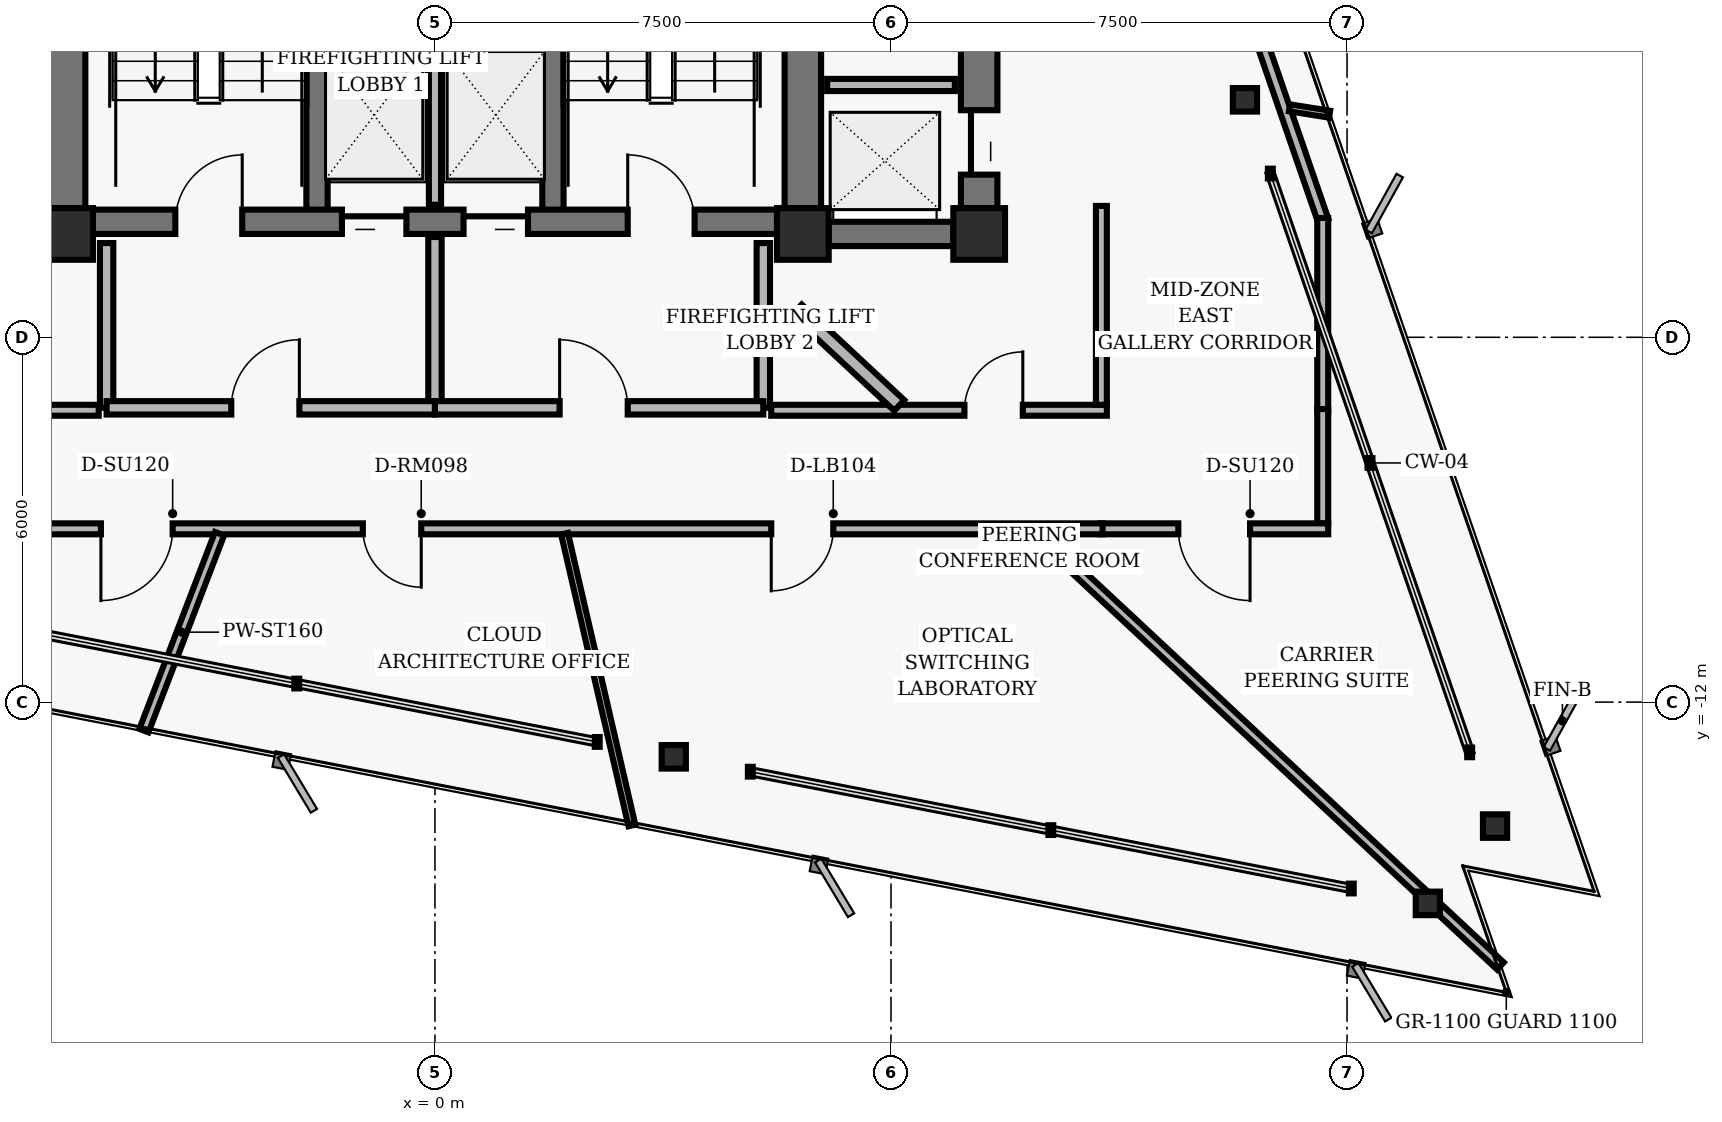
"""IFC4 building model, lengths in metres.
Left out: names, types, materials, properties, quantities, classifications, styles, units other than length and angle.
Written with IfcOpenShell. Run it as: python <this file> out.ifc"""

import sys

from ifc_helpers import new_model, si_unit, direction, frame, frame_2d, origin, origin_2d, place, context, subcontext, project, spatial, rectangle, hollow_rectangle, i_section, extrude, element, fill, save


model = new_model("IFC4")
c1 = context("Model", 3, precision=1e-05, world=origin(), true_north=direction((0.0, 1.0)))
c2 = subcontext(c1, "Body", "Model", "MODEL_VIEW")
j1 = project(units=[si_unit("LENGTHUNIT", "METRE"), si_unit("PLANEANGLEUNIT", "RADIAN")], contexts=[c1])
p1 = place(None, origin())
s1 = spatial("IfcSite", under=j1, at=p1, CompositionType="ELEMENT")
p2 = place(p1, origin())
s2 = spatial("IfcBuilding", under=s1, at=p2, CompositionType="ELEMENT")
p3 = place(p2, frame((0.0, 0.0, 168.48)))
s3 = spatial("IfcBuildingStorey", under=s2, at=p3, CompositionType="ELEMENT", Elevation=168.48)
for number, where, z_axis, x_axis in (
    (1, (-6.05, -4.3, 0.0), (0.0, 0.0, 1.0), (1.0, 0.0, 0.0)),
    (2, (6.05, -4.3, 0.0), (0.0, 0.0, 1.0), (1.0, 0.0, 0.0)),
    (3, (8.95, -4.3, 0.0), (0.0, 0.0, 1.0), (1.0, 0.0, 0.0)),
):
    element("IfcColumn", number, at=place(p3, frame(where, z_axis=z_axis, x_axis=x_axis)), inside=s3, PredefinedType="COLUMN", context=c2, shape_type="SweptSolid", body=[
        extrude(hollow_rectangle(XDim=0.85, YDim=0.85, WallThickness=0.055, InnerFilletRadius=0.02, OuterFilletRadius=0.04, at=origin_2d()), origin(), (0.0, 0.0, 1.0), 3.04),
    ])
for number, where, z_axis, x_axis in (
    (4, (-6.05, -3.875, 0.0), (0.0, 0.0, 1.0), (0.0, 1.0, 0.0)),
    (5, (6.05, -3.875, 0.0), (0.0, 0.0, 1.0), (0.0, 1.0, 0.0)),
):
    element("IfcWall", number, at=place(p3, frame(where, z_axis=z_axis, x_axis=x_axis)), inside=s3, PredefinedType="SHEAR", context=c2, shape_type="SweptSolid", body=[
        extrude(rectangle(XDim=3.45, YDim=0.6, at=frame_2d((1.725, 0.0))), origin(), (0.0, 0.0, 1.0), 2.718),
    ])
for number, where, z_axis, x_axis in (
    (6, (-1.94, -4.1, 0.0), (0.0, 0.0, 1.0), (0.0, 1.0, 0.0)),
    (7, (1.94, -4.1, 0.0), (0.0, 0.0, 1.0), (0.0, 1.0, 0.0)),
):
    element("IfcWall", number, at=place(p3, frame(where, z_axis=z_axis, x_axis=x_axis)), inside=s3, PredefinedType="SHEAR", context=c2, shape_type="SweptSolid", body=[
        extrude(rectangle(XDim=8.2, YDim=0.35, at=frame_2d((4.1, 0.0))), origin(), (0.0, 0.0, 1.0), 2.718),
    ])
p4 = place(p3, frame((-5.625, -4.1, 0.0), z_axis=(0.0, 0.0, 1.0), x_axis=(1.0, 0.0, 0.0)))
e8 = element("IfcWall", 8, at=p4, inside=s3, PredefinedType="SHEAR", context=c2, shape_type="SweptSolid", body=[
    extrude(rectangle(XDim=11.25, YDim=0.4, at=frame_2d((5.625, 0.0))), origin(), (0.0, 0.0, 1.0), 2.718),
])
p5 = place(p4, frame((1.355, 0.0, 0.0)))
e9 = element("IfcOpeningElement", 9, at=p5, cuts=e8, PredefinedType="OPENING", context=c2, shape_type="SweptSolid", body=[
    extrude(rectangle(XDim=1.1, YDim=2.04, at=frame_2d((0.55, 1.02))), frame((0.0, 0.21, 0.0), z_axis=(0.0, -1.0, 0.0), x_axis=(1.0, 0.0, 0.0)), (0.0, 0.0, 1.0), 0.42),
])
p6 = place(p4, frame((8.795, 0.0, 0.0)))
e10 = element("IfcOpeningElement", 10, at=p6, cuts=e8, PredefinedType="OPENING", context=c2, shape_type="SweptSolid", body=[
    extrude(rectangle(XDim=1.1, YDim=2.04, at=frame_2d((0.55, 1.02))), frame((0.0, 0.21, 0.0), z_axis=(0.0, -1.0, 0.0), x_axis=(1.0, 0.0, 0.0)), (0.0, 0.0, 1.0), 0.42),
])
p7 = place(p4, frame((4.095, 0.0, 0.0)))
e11 = element("IfcOpeningElement", 11, at=p7, cuts=e8, PredefinedType="OPENING", context=c2, shape_type="SweptSolid", body=[
    extrude(rectangle(XDim=1.06, YDim=2.04, at=frame_2d((0.53, 1.02))), frame((0.0, 0.21, 0.0), z_axis=(0.0, -1.0, 0.0), x_axis=(1.0, 0.0, 0.0)), (0.0, 0.0, 1.0), 0.42),
])
p8 = place(p4, frame((6.095, 0.0, 0.0)))
e12 = element("IfcOpeningElement", 12, at=p8, cuts=e8, PredefinedType="OPENING", context=c2, shape_type="SweptSolid", body=[
    extrude(rectangle(XDim=1.06, YDim=2.04, at=frame_2d((0.53, 1.02))), frame((0.0, 0.21, 0.0), z_axis=(0.0, -1.0, 0.0), x_axis=(1.0, 0.0, 0.0)), (0.0, 0.0, 1.0), 0.42),
])
p9 = place(p3, frame((8.95, -3.875, 0.0), z_axis=(0.0, 0.0, 1.0), x_axis=(0.0, 1.0, 0.0)))
e13 = element("IfcWall", 13, at=p9, inside=s3, PredefinedType="SHEAR", context=c2, shape_type="SweptSolid", body=[
    extrude(rectangle(XDim=7.95, YDim=0.6, at=frame_2d((3.975, 0.0))), origin(), (0.0, 0.0, 1.0), 2.718),
])
p10 = place(p9, frame((0.55, 0.0, 0.0)))
e14 = element("IfcOpeningElement", 14, at=p10, cuts=e13, PredefinedType="OPENING", context=c2, shape_type="SweptSolid", body=[
    extrude(rectangle(XDim=1.06, YDim=2.04, at=frame_2d((0.53, 1.02))), frame((0.0, 0.31, 0.0), z_axis=(0.0, -1.0, 0.0), x_axis=(1.0, 0.0, 0.0)), (0.0, 0.0, 1.0), 0.62),
])
p11 = place(p9, frame((3.445, 0.0, 0.0)))
e15 = element("IfcOpeningElement", 15, at=p11, cuts=e13, PredefinedType="OPENING", context=c2, shape_type="SweptSolid", body=[
    extrude(rectangle(XDim=1.06, YDim=2.04, at=frame_2d((0.53, 1.02))), frame((0.0, 0.31, 0.0), z_axis=(0.0, -1.0, 0.0), x_axis=(1.0, 0.0, 0.0)), (0.0, 0.0, 1.0), 0.62),
])
p12 = place(p9, frame((6.33, 0.0, 0.0)))
e16 = element("IfcOpeningElement", 16, at=p12, cuts=e13, PredefinedType="OPENING", context=c2, shape_type="SweptSolid", body=[
    extrude(rectangle(XDim=1.06, YDim=2.04, at=frame_2d((0.53, 1.02))), frame((0.0, 0.31, 0.0), z_axis=(0.0, -1.0, 0.0), x_axis=(1.0, 0.0, 0.0)), (0.0, 0.0, 1.0), 0.62),
])
p13 = place(p3, frame((6.475, -4.3, 0.0), z_axis=(0.0, 0.0, 1.0), x_axis=(1.0, 0.0, 0.0)))
e17 = element("IfcWall", 17, at=p13, inside=s3, PredefinedType="SHEAR", context=c2, shape_type="SweptSolid", body=[
    extrude(rectangle(XDim=2.05, YDim=0.4, at=frame_2d((1.025, 0.0))), origin(), (0.0, 0.0, 1.0), 2.718),
])
for number, where, z_axis, x_axis in (
    (18, (17.434, -14.039, 0.0), (0.0, 0.0, 1.0), (1.0, 0.0, 0.0)),
    (19, (13.321, -2.094, 0.0), (0.0, 0.0, 1.0), (1.0, 0.0, 0.0)),
    (20, (3.927, -12.9, 0.0), (0.0, 0.0, 1.0), (1.0, 0.0, 0.0)),
    (21, (16.329, -15.311, 0.0), (0.0, 0.0, 1.0), (1.0, 0.0, 0.0)),
):
    element("IfcColumn", number, at=place(p3, frame(where, z_axis=z_axis, x_axis=x_axis)), inside=s3, PredefinedType="COLUMN", context=c2, shape_type="SweptSolid", body=[
        extrude(i_section(OverallWidth=0.398, OverallDepth=0.387, WebThickness=0.021, FlangeThickness=0.033, FilletRadius=0.018, at=origin_2d()), origin(), (0.0, 0.0, 1.0), 3.04),
    ])
p14 = place(p3, frame((0.0, -3.82, 0.0), z_axis=(0.0, 0.0, 1.0), x_axis=(0.0, 1.0, 0.0)))
e22 = element("IfcWall", 22, at=p14, inside=s3, PredefinedType="PARTITIONING", context=c2, shape_type="SweptSolid", body=[
    extrude(rectangle(XDim=2.67, YDim=0.2, at=frame_2d((1.335, 0.0))), origin(), (0.0, 0.0, 1.0), 2.693),
])
for number, where, z_axis, x_axis in (
    (23, (-5.4, -7.16, 0.0), (0.0, 0.0, 1.0), (0.0, 1.0, 0.0)),
    (24, (5.4, -7.16, 0.0), (0.0, 0.0, 1.0), (0.0, 1.0, 0.0)),
):
    element("IfcWall", number, at=place(p3, frame(where, z_axis=z_axis, x_axis=x_axis)), inside=s3, PredefinedType="PARTITIONING", context=c2, shape_type="SweptSolid", body=[
        extrude(rectangle(XDim=2.71, YDim=0.22, at=frame_2d((1.355, 0.0))), origin(), (0.0, 0.0, 1.0), 2.693),
    ])
p15 = place(p3, frame((0.0, -7.16, 0.0), z_axis=(0.0, 0.0, 1.0), x_axis=(0.0, 1.0, 0.0)))
e25 = element("IfcWall", 25, at=p15, inside=s3, PredefinedType="PARTITIONING", context=c2, shape_type="SweptSolid", body=[
    extrude(rectangle(XDim=2.81, YDim=0.22, at=frame_2d((1.405, 0.0))), origin(), (0.0, 0.0, 1.0), 2.693),
])
p16 = place(p3, frame((-5.4, -7.16, 0.0), z_axis=(0.0, 0.0, 1.0), x_axis=(1.0, 0.0, 0.0)))
e26 = element("IfcWall", 26, at=p16, inside=s3, PredefinedType="PARTITIONING", context=c2, shape_type="SweptSolid", body=[
    extrude(rectangle(XDim=5.4, YDim=0.22, at=frame_2d((2.7, 0.0))), origin(), (0.0, 0.0, 1.0), 2.26),
])
p17 = place(p16, frame((2.05, 0.0, 0.0)))
e27 = element("IfcOpeningElement", 27, at=p17, cuts=e26, PredefinedType="OPENING", context=c2, shape_type="SweptSolid", body=[
    extrude(rectangle(XDim=1.12, YDim=2.02, at=frame_2d((0.56, 1.01))), frame((0.0, 0.12, 0.0), z_axis=(0.0, -1.0, 0.0), x_axis=(1.0, 0.0, 0.0)), (0.0, 0.0, 1.0), 0.24),
])
p18 = place(p3, frame((0.0, -7.16, 0.0), z_axis=(0.0, 0.0, 1.0), x_axis=(1.0, 0.0, 0.0)))
e28 = element("IfcWall", 28, at=p18, inside=s3, PredefinedType="PARTITIONING", context=c2, shape_type="SweptSolid", body=[
    extrude(rectangle(XDim=5.4, YDim=0.22, at=frame_2d((2.7, 0.0))), origin(), (0.0, 0.0, 1.0), 2.26),
])
p19 = place(p18, frame((2.05, 0.0, 0.0)))
e29 = element("IfcOpeningElement", 29, at=p19, cuts=e28, PredefinedType="OPENING", context=c2, shape_type="SweptSolid", body=[
    extrude(rectangle(XDim=1.12, YDim=2.02, at=frame_2d((0.56, 1.01))), frame((0.0, 0.12, 0.0), z_axis=(0.0, -1.0, 0.0), x_axis=(1.0, 0.0, 0.0)), (0.0, 0.0, 1.0), 0.24),
])
p20 = place(p3, frame((6.45, -1.85, 0.0), z_axis=(0.0, 0.0, 1.0), x_axis=(1.0, 0.0, 0.0)))
e30 = element("IfcWall", 30, at=p20, inside=s3, PredefinedType="PARTITIONING", context=c2, shape_type="SweptSolid", body=[
    extrude(rectangle(XDim=2.1, YDim=0.2, at=frame_2d((1.05, 0.0))), origin(), (0.0, 0.0, 1.0), 2.693),
])
p21 = place(p3, frame((-6.59, -7.2, 0.0), z_axis=(0.0, 0.0, 1.0), x_axis=(1.0, 0.0, 0.0)))
e31 = element("IfcWall", 31, at=p21, inside=s3, PredefinedType="PARTITIONING", context=c2, shape_type="SweptSolid", body=[
    extrude(rectangle(XDim=1.06, YDim=0.18, at=frame_2d((0.53, 0.0))), origin(), (0.0, 0.0, 1.0), 2.693),
])
p22 = place(p3, frame((5.53, -7.2, 0.0), z_axis=(0.0, 0.0, 1.0), x_axis=(1.0, 0.0, 0.0)))
e32 = element("IfcWall", 32, at=p22, inside=s3, PredefinedType="PARTITIONING", context=c2, shape_type="SweptSolid", body=[
    extrude(rectangle(XDim=5.52, YDim=0.18, at=frame_2d((2.76, 0.0))), origin(), (0.0, 0.0, 1.0), 2.26),
])
p23 = place(p22, frame((3.177, 0.0, 0.0)))
e33 = element("IfcOpeningElement", 33, at=p23, cuts=e32, PredefinedType="OPENING", context=c2, shape_type="SweptSolid", body=[
    extrude(rectangle(XDim=0.96, YDim=2.02, at=frame_2d((0.48, 1.01))), frame((0.0, 0.1, 0.0), z_axis=(0.0, -1.0, 0.0), x_axis=(1.0, 0.0, 0.0)), (0.0, 0.0, 1.0), 0.2),
])
p24 = place(p3, frame((10.96, -7.11, 0.0), z_axis=(0.0, 0.0, 1.0), x_axis=(0.0, 1.0, 0.0)))
e34 = element("IfcWall", 34, at=p24, inside=s3, PredefinedType="PARTITIONING", context=c2, shape_type="SweptSolid", body=[
    extrude(rectangle(XDim=3.271, YDim=0.18, at=frame_2d((1.635, 0.0))), origin(), (0.0, 0.0, 1.0), 2.693),
])
p25 = place(p3, frame((10.954, 6.533, 0.0), z_axis=(0.0, 0.0, 1.0), x_axis=(0.325553439946, -0.945523642084, 0.0)))
e35 = element("IfcWall", 35, at=p25, inside=s3, PredefinedType="PARTITIONING", context=c2, shape_type="SweptSolid", body=[
    extrude(rectangle(XDim=11.22, YDim=0.18, at=frame_2d((5.61, 0.0))), origin(), (0.0, 0.0, 1.0), 2.693),
])
p26 = place(p3, frame((14.6, -4.038, 0.0), z_axis=(0.0, 0.0, 1.0), x_axis=(0.0, -1.0, 0.0)))
e36 = element("IfcWall", 36, at=p26, inside=s3, PredefinedType="PARTITIONING", context=c2, shape_type="SweptSolid", body=[
    extrude(rectangle(XDim=3.182, YDim=0.18, at=frame_2d((1.591, 0.0))), origin(), (0.0, 0.0, 1.0), 2.693),
])
p27 = place(p3, frame((14.6, -7.18, 0.0), z_axis=(0.0, 0.0, 1.0), x_axis=(0.0, -1.0, 0.0)))
e37 = element("IfcWall", 37, at=p27, inside=s3, PredefinedType="PARTITIONING", context=c2, shape_type="SweptSolid", body=[
    extrude(rectangle(XDim=1.88, YDim=0.18, at=frame_2d((0.94, 0.0))), origin(), (0.0, 0.0, 1.0), 2.693),
])
p28 = place(p3, frame((14.69, -9.15, 0.0), z_axis=(0.0, 0.0, 1.0), x_axis=(-1.0, 0.0, 0.0)))
e38 = element("IfcWall", 38, at=p28, inside=s3, PredefinedType="PARTITIONING", context=c2, shape_type="SweptSolid", body=[
    extrude(rectangle(XDim=3.75, YDim=0.18, at=frame_2d((1.875, 0.0))), origin(), (0.0, 0.0, 1.0), 2.693),
])
p29 = place(p28, frame((1.285, 0.0, 0.0)))
e39 = element("IfcOpeningElement", 39, at=p29, cuts=e38, PredefinedType="OPENING", context=c2, shape_type="SweptSolid", body=[
    extrude(rectangle(XDim=1.18, YDim=2.02, at=frame_2d((0.59, 1.01))), frame((0.0, 0.1, 0.0), z_axis=(0.0, -1.0, 0.0), x_axis=(1.0, 0.0, 0.0)), (0.0, 0.0, 1.0), 0.2),
])
p30 = place(p3, frame((10.98, -9.15, 0.0), z_axis=(0.0, 0.0, 1.0), x_axis=(-1.0, 0.0, 0.0)))
e40 = element("IfcWall", 40, at=p30, inside=s3, PredefinedType="PARTITIONING", context=c2, shape_type="SweptSolid", body=[
    extrude(rectangle(XDim=17.5, YDim=0.18, at=frame_2d((8.75, 0.0))), origin(), (0.0, 0.0, 1.0), 2.26),
])
p31 = place(p30, frame((15.294, 0.0, 0.0)))
e41 = element("IfcOpeningElement", 41, at=p31, cuts=e40, PredefinedType="OPENING", context=c2, shape_type="SweptSolid", body=[
    extrude(rectangle(XDim=1.18, YDim=2.02, at=frame_2d((0.59, 1.01))), frame((0.0, 0.1, 0.0), z_axis=(0.0, -1.0, 0.0), x_axis=(1.0, 0.0, 0.0)), (0.0, 0.0, 1.0), 0.2),
])
p32 = place(p30, frame((11.206, 0.0, 0.0)))
e42 = element("IfcOpeningElement", 42, at=p32, cuts=e40, PredefinedType="OPENING", context=c2, shape_type="SweptSolid", body=[
    extrude(rectangle(XDim=0.96, YDim=2.02, at=frame_2d((0.48, 1.01))), frame((0.0, 0.1, 0.0), z_axis=(0.0, -1.0, 0.0), x_axis=(1.0, 0.0, 0.0)), (0.0, 0.0, 1.0), 0.2),
])
p33 = place(p30, frame((4.43, 0.0, 0.0)))
e43 = element("IfcOpeningElement", 43, at=p33, cuts=e40, PredefinedType="OPENING", context=c2, shape_type="SweptSolid", body=[
    extrude(rectangle(XDim=1.02, YDim=2.02, at=frame_2d((0.51, 1.01))), frame((0.0, 0.1, 0.0), z_axis=(0.0, -1.0, 0.0), x_axis=(1.0, 0.0, 0.0)), (0.0, 0.0, 1.0), 0.2),
])
p34 = place(p3, frame((-3.543, -9.23, 0.0), z_axis=(0.0, 0.0, 1.0), x_axis=(-0.358337785815, -0.933592004709, 0.0)))
e44 = element("IfcWall", 44, at=p34, inside=s3, PredefinedType="PARTITIONING", context=c2, shape_type="SweptSolid", body=[
    extrude(rectangle(XDim=3.47, YDim=0.16, at=frame_2d((1.735, 0.0))), origin(), (0.0, 0.0, 1.0), 2.693),
])
p35 = place(p3, frame((2.131, -9.23, 0.0), z_axis=(0.0, 0.0, 1.0), x_axis=(0.224978964049, -0.974363620901, 0.0)))
e45 = element("IfcWall", 45, at=p35, inside=s3, PredefinedType="MOVABLE", context=c2, shape_type="SweptSolid", body=[
    extrude(rectangle(XDim=4.926, YDim=0.115, at=frame_2d((2.463, 0.0))), origin(), (0.0, 0.0, 1.0), 2.693),
])
p36 = place(p3, frame((5.95, -5.549, 0.0), z_axis=(0.0, 0.0, 1.0), x_axis=(0.731361714987, -0.681989766677, 0.0)))
e46 = element("IfcWall", 46, at=p36, inside=s3, PredefinedType="PARTITIONING", context=c2, shape_type="SweptSolid", body=[
    extrude(rectangle(XDim=2.304, YDim=0.24, at=frame_2d((1.152, 0.0))), origin(), (0.0, 0.0, 1.0), 2.693),
])
p37 = place(p3, frame((9.898, -9.23, 0.0), z_axis=(0.0, 0.0, 1.0), x_axis=(0.731357336059, -0.681994462582, 0.0)))
e47 = element("IfcWall", 47, at=p37, inside=s3, PredefinedType="PARTITIONING", context=c2, shape_type="SweptSolid", body=[
    extrude(rectangle(XDim=10.426, YDim=0.16, at=frame_2d((5.213, 0.0))), origin(), (0.0, 0.0, 1.0), 2.062),
])
p38 = place(p3, frame((14.054, -2.226, 0.0), z_axis=(0.0, 0.0, 1.0), x_axis=(0.987638222243, -0.156750572454, 0.0)))
e48 = element("IfcWall", 48, at=p38, inside=s3, PredefinedType="MOVABLE", context=c2, shape_type="SweptSolid", body=[
    extrude(rectangle(XDim=0.668, YDim=0.115, at=frame_2d((0.334, 0.0))), origin(), (0.0, 0.0, 1.0), 2.693),
])
p39 = place(p5, origin())
e49 = element("IfcDoor", 49, at=p39, inside=s3, OperationType="SINGLE_SWING_RIGHT", PredefinedType="DOOR", context=c2, shape_type="SweptSolid", body=[
    extrude(rectangle(XDim=1.1, YDim=2.04, at=frame_2d((0.55, 1.02))), frame((0.0, 0.025, 0.0), z_axis=(0.0, -1.0, 0.0), x_axis=(1.0, 0.0, 0.0)), (0.0, 0.0, 1.0), 0.05),
])
fill(e9, e49)
p40 = place(p6, origin())
e50 = element("IfcDoor", 50, at=p40, inside=s3, OperationType="SINGLE_SWING_LEFT", PredefinedType="DOOR", context=c2, shape_type="SweptSolid", body=[
    extrude(rectangle(XDim=1.1, YDim=2.04, at=frame_2d((0.55, 1.02))), frame((0.0, 0.025, 0.0), z_axis=(0.0, -1.0, 0.0), x_axis=(1.0, 0.0, 0.0)), (0.0, 0.0, 1.0), 0.05),
])
fill(e10, e50)
p41 = place(p7, origin())
e51 = element("IfcDoor", 51, at=p41, inside=s3, OperationType="SLIDING_TO_LEFT", PredefinedType="DOOR", context=c2, shape_type="SweptSolid", body=[
    extrude(rectangle(XDim=1.06, YDim=2.04, at=frame_2d((0.53, 1.02))), frame((0.0, 0.025, 0.0), z_axis=(0.0, -1.0, 0.0), x_axis=(1.0, 0.0, 0.0)), (0.0, 0.0, 1.0), 0.05),
])
fill(e11, e51)
p42 = place(p8, origin())
e52 = element("IfcDoor", 52, at=p42, inside=s3, OperationType="SLIDING_TO_RIGHT", PredefinedType="DOOR", context=c2, shape_type="SweptSolid", body=[
    extrude(rectangle(XDim=1.06, YDim=2.04, at=frame_2d((0.53, 1.02))), frame((0.0, 0.025, 0.0), z_axis=(0.0, -1.0, 0.0), x_axis=(1.0, 0.0, 0.0)), (0.0, 0.0, 1.0), 0.05),
])
fill(e12, e52)
p43 = place(p17, origin())
e53 = element("IfcDoor", 53, at=p43, inside=s3, OperationType="SINGLE_SWING_RIGHT", PredefinedType="DOOR", context=c2, shape_type="SweptSolid", body=[
    extrude(rectangle(XDim=1.12, YDim=2.02, at=frame_2d((0.56, 1.01))), frame((0.0, 0.025, 0.0), z_axis=(0.0, -1.0, 0.0), x_axis=(1.0, 0.0, 0.0)), (0.0, 0.0, 1.0), 0.05),
])
fill(e27, e53)
p44 = place(p19, origin())
e54 = element("IfcDoor", 54, at=p44, inside=s3, OperationType="SINGLE_SWING_LEFT", PredefinedType="DOOR", context=c2, shape_type="SweptSolid", body=[
    extrude(rectangle(XDim=1.12, YDim=2.02, at=frame_2d((0.56, 1.01))), frame((0.0, 0.025, 0.0), z_axis=(0.0, -1.0, 0.0), x_axis=(1.0, 0.0, 0.0)), (0.0, 0.0, 1.0), 0.05),
])
fill(e29, e54)
p45 = place(p10, origin())
e55 = element("IfcDoor", 55, at=p45, inside=s3, OperationType="SLIDING_TO_LEFT", PredefinedType="DOOR", context=c2, shape_type="SweptSolid", body=[
    extrude(rectangle(XDim=1.06, YDim=2.04, at=frame_2d((0.53, 1.02))), frame((0.0, 0.025, 0.0), z_axis=(0.0, -1.0, 0.0), x_axis=(1.0, 0.0, 0.0)), (0.0, 0.0, 1.0), 0.05),
])
fill(e14, e55)
p46 = place(p31, origin())
e56 = element("IfcDoor", 56, at=p46, inside=s3, OperationType="SINGLE_SWING_RIGHT", PredefinedType="DOOR", context=c2, shape_type="SweptSolid", body=[
    extrude(rectangle(XDim=1.18, YDim=2.02, at=frame_2d((0.59, 1.01))), frame((0.0, 0.025, 0.0), z_axis=(0.0, -1.0, 0.0), x_axis=(1.0, 0.0, 0.0)), (0.0, 0.0, 1.0), 0.05),
])
fill(e41, e56)
p47 = place(p32, origin())
e57 = element("IfcDoor", 57, at=p47, inside=s3, OperationType="SINGLE_SWING_LEFT", PredefinedType="DOOR", context=c2, shape_type="SweptSolid", body=[
    extrude(rectangle(XDim=0.96, YDim=2.02, at=frame_2d((0.48, 1.01))), frame((0.0, 0.025, 0.0), z_axis=(0.0, -1.0, 0.0), x_axis=(1.0, 0.0, 0.0)), (0.0, 0.0, 1.0), 0.05),
])
fill(e42, e57)
p48 = place(p33, origin())
e58 = element("IfcDoor", 58, at=p48, inside=s3, OperationType="SINGLE_SWING_RIGHT", PredefinedType="DOOR", context=c2, shape_type="SweptSolid", body=[
    extrude(rectangle(XDim=1.02, YDim=2.02, at=frame_2d((0.51, 1.01))), frame((0.0, 0.025, 0.0), z_axis=(0.0, -1.0, 0.0), x_axis=(1.0, 0.0, 0.0)), (0.0, 0.0, 1.0), 0.05),
])
fill(e43, e58)
p49 = place(p29, origin())
e59 = element("IfcDoor", 59, at=p49, inside=s3, OperationType="SINGLE_SWING_LEFT", PredefinedType="DOOR", context=c2, shape_type="SweptSolid", body=[
    extrude(rectangle(XDim=1.18, YDim=2.02, at=frame_2d((0.59, 1.01))), frame((0.0, 0.025, 0.0), z_axis=(0.0, -1.0, 0.0), x_axis=(1.0, 0.0, 0.0)), (0.0, 0.0, 1.0), 0.05),
])
fill(e39, e59)
p50 = place(p23, origin())
e60 = element("IfcDoor", 60, at=p50, inside=s3, OperationType="SINGLE_SWING_RIGHT", PredefinedType="DOOR", context=c2, shape_type="SweptSolid", body=[
    extrude(rectangle(XDim=0.96, YDim=2.02, at=frame_2d((0.48, 1.01))), frame((0.0, 0.025, 0.0), z_axis=(0.0, -1.0, 0.0), x_axis=(1.0, 0.0, 0.0)), (0.0, 0.0, 1.0), 0.05),
])
fill(e33, e60)
save(model, sys.argv[1])
